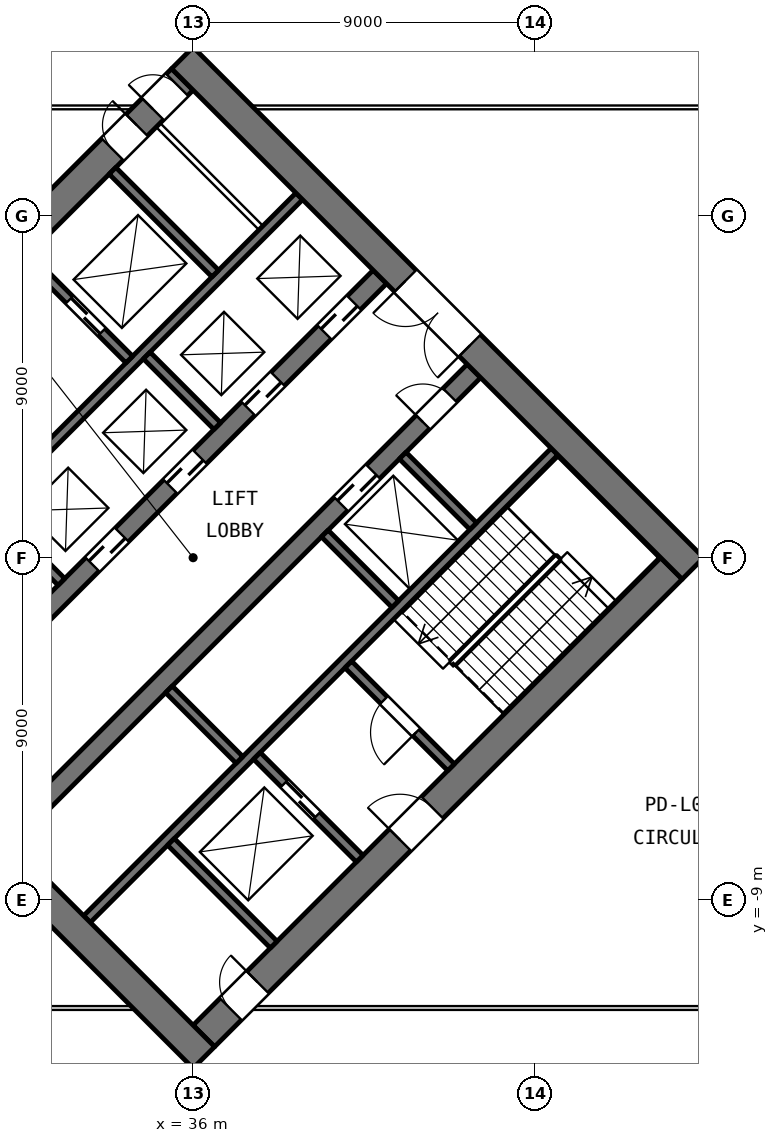
"""IFC4 building model, lengths in metres.
Left out: names, types, materials, properties, quantities, classifications, styles, units other than length and angle.
Written with IfcOpenShell. Run it as: python <this file> out.ifc"""

import sys

from ifc_helpers import new_model, si_unit, direction, frame, frame_2d, origin, place, context, subcontext, project, spatial, rectangle, extrude, element, fill, save


model = new_model("IFC4")
c1 = context("Model", 3, precision=1e-05, world=origin(), true_north=direction((0.0, 1.0)))
c2 = subcontext(c1, "Body", "Model", "MODEL_VIEW")
j1 = project(units=[si_unit("LENGTHUNIT", "METRE"), si_unit("PLANEANGLEUNIT", "RADIAN")], contexts=[c1])
p1 = place(None, origin())
s1 = spatial("IfcSite", under=j1, at=p1, CompositionType="ELEMENT")
p2 = place(p1, origin())
s2 = spatial("IfcBuilding", under=s1, at=p2, CompositionType="ELEMENT")
p3 = place(p2, frame((0.0, 0.0, 12.6)))
s3 = spatial("IfcBuildingStorey", under=s2, at=p3, CompositionType="ELEMENT", Elevation=12.6)
p4 = place(p3, frame((36.283, -12.586, 0.0), z_axis=(0.0, 0.0, 1.0), x_axis=(0.707106781187, 0.707106781187, 0.0)))
e1 = element("IfcWall", 1, at=p4, inside=s3, PredefinedType="SHEAR", context=c2, shape_type="SweptSolid", body=[
    extrude(rectangle(XDim=17.4, YDim=0.8, at=frame_2d((8.7, 0.0))), origin(), (0.0, 0.0, 1.0), 5.1),
])
p5 = place(p4, frame((7.3, 0.0, 0.0)))
e2 = element("IfcOpeningElement", 2, at=p5, cuts=e1, PredefinedType="OPENING", context=c2, shape_type="SweptSolid", body=[
    extrude(rectangle(XDim=1.2, YDim=2.1, at=frame_2d((0.6, 1.05))), frame((0.0, 0.41, 0.0), z_axis=(0.0, -1.0, 0.0), x_axis=(1.0, 0.0, 0.0)), (0.0, 0.0, 1.0), 0.82),
])
p6 = place(p4, frame((1.0, 0.0, 0.0)))
e3 = element("IfcOpeningElement", 3, at=p6, cuts=e1, PredefinedType="OPENING", context=c2, shape_type="SweptSolid", body=[
    extrude(rectangle(XDim=1.0, YDim=2.1, at=frame_2d((0.5, 1.05))), frame((0.0, 0.41, 0.0), z_axis=(0.0, -1.0, 0.0), x_axis=(1.0, 0.0, 0.0)), (0.0, 0.0, 1.0), 0.82),
])
p7 = place(p3, frame((33.207, -9.51, 0.0), z_axis=(0.0, 0.0, 1.0), x_axis=(0.707106781187, 0.707106781187, 0.0)))
e4 = element("IfcWall", 4, at=p7, inside=s3, PredefinedType="SHEAR", context=c2, shape_type="SweptSolid", body=[
    extrude(rectangle(XDim=17.4, YDim=0.25, at=frame_2d((8.7, 0.0))), origin(), (0.0, 0.0, 1.0), 5.1),
])
p8 = place(p3, frame((31.086, -7.389, 0.0), z_axis=(0.0, 0.0, 1.0), x_axis=(0.707106781187, 0.707106781187, 0.0)))
e5 = element("IfcWall", 5, at=p8, inside=s3, PredefinedType="SHEAR", context=c2, shape_type="SweptSolid", body=[
    extrude(rectangle(XDim=17.4, YDim=0.5, at=frame_2d((8.7, 0.0))), origin(), (0.0, 0.0, 1.0), 5.1),
])
p9 = place(p8, frame((12.45, 0.0, 0.0)))
e6 = element("IfcOpeningElement", 6, at=p9, cuts=e5, PredefinedType="OPENING", context=c2, shape_type="SweptSolid", body=[
    extrude(rectangle(XDim=1.2, YDim=2.1, at=frame_2d((0.6, 1.05))), frame((0.0, 0.26, 0.0), z_axis=(0.0, -1.0, 0.0), x_axis=(1.0, 0.0, 0.0)), (0.0, 0.0, 1.0), 0.52),
])
p10 = place(p8, frame((15.5, 0.0, 0.0)))
e7 = element("IfcOpeningElement", 7, at=p10, cuts=e5, PredefinedType="OPENING", context=c2, shape_type="SweptSolid", body=[
    extrude(rectangle(XDim=1.0, YDim=2.1, at=frame_2d((0.5, 1.05))), frame((0.0, 0.26, 0.0), z_axis=(0.0, -1.0, 0.0), x_axis=(1.0, 0.0, 0.0)), (0.0, 0.0, 1.0), 0.52),
])
p11 = place(p3, frame((28.611, -4.914, 0.0), z_axis=(0.0, 0.0, 1.0), x_axis=(0.707106781187, 0.707106781187, 0.0)))
e8 = element("IfcWall", 8, at=p11, inside=s3, PredefinedType="SHEAR", context=c2, shape_type="SweptSolid", body=[
    extrude(rectangle(XDim=17.4, YDim=0.5, at=frame_2d((8.7, 0.0))), origin(), (0.0, 0.0, 1.0), 5.1),
])
p12 = place(p11, frame((0.962, 0.0, 0.0)))
e9 = element("IfcOpeningElement", 9, at=p12, cuts=e8, PredefinedType="OPENING", context=c2, shape_type="SweptSolid", body=[
    extrude(rectangle(XDim=1.1, YDim=2.1, at=frame_2d((0.55, 1.05))), frame((0.0, 0.26, 0.0), z_axis=(0.0, -1.0, 0.0), x_axis=(1.0, 0.0, 0.0)), (0.0, 0.0, 1.0), 0.52),
])
p13 = place(p11, frame((3.8, 0.0, 0.0)))
e10 = element("IfcOpeningElement", 10, at=p13, cuts=e8, PredefinedType="OPENING", context=c2, shape_type="SweptSolid", body=[
    extrude(rectangle(XDim=1.1, YDim=2.1, at=frame_2d((0.55, 1.05))), frame((0.0, 0.26, 0.0), z_axis=(0.0, -1.0, 0.0), x_axis=(1.0, 0.0, 0.0)), (0.0, 0.0, 1.0), 0.52),
])
p14 = place(p11, frame((6.7, 0.0, 0.0)))
e11 = element("IfcOpeningElement", 11, at=p14, cuts=e8, PredefinedType="OPENING", context=c2, shape_type="SweptSolid", body=[
    extrude(rectangle(XDim=1.1, YDim=2.1, at=frame_2d((0.55, 1.05))), frame((0.0, 0.26, 0.0), z_axis=(0.0, -1.0, 0.0), x_axis=(1.0, 0.0, 0.0)), (0.0, 0.0, 1.0), 0.52),
])
p15 = place(p11, frame((9.6, 0.0, 0.0)))
e12 = element("IfcOpeningElement", 12, at=p15, cuts=e8, PredefinedType="OPENING", context=c2, shape_type="SweptSolid", body=[
    extrude(rectangle(XDim=1.1, YDim=2.1, at=frame_2d((0.55, 1.05))), frame((0.0, 0.26, 0.0), z_axis=(0.0, -1.0, 0.0), x_axis=(1.0, 0.0, 0.0)), (0.0, 0.0, 1.0), 0.52),
])
p16 = place(p11, frame((12.5, 0.0, 0.0)))
e13 = element("IfcOpeningElement", 13, at=p16, cuts=e8, PredefinedType="OPENING", context=c2, shape_type="SweptSolid", body=[
    extrude(rectangle(XDim=1.1, YDim=2.1, at=frame_2d((0.55, 1.05))), frame((0.0, 0.26, 0.0), z_axis=(0.0, -1.0, 0.0), x_axis=(1.0, 0.0, 0.0)), (0.0, 0.0, 1.0), 0.52),
])
p17 = place(p11, frame((15.337, 0.0, 0.0)))
e14 = element("IfcOpeningElement", 14, at=p17, cuts=e8, PredefinedType="OPENING", context=c2, shape_type="SweptSolid", body=[
    extrude(rectangle(XDim=1.1, YDim=2.1, at=frame_2d((0.55, 1.05))), frame((0.0, 0.26, 0.0), z_axis=(0.0, -1.0, 0.0), x_axis=(1.0, 0.0, 0.0)), (0.0, 0.0, 1.0), 0.52),
])
p18 = place(p3, frame((26.49, -2.793, 0.0), z_axis=(0.0, 0.0, 1.0), x_axis=(0.707106781187, 0.707106781187, 0.0)))
e15 = element("IfcWall", 15, at=p18, inside=s3, PredefinedType="SHEAR", context=c2, shape_type="SweptSolid", body=[
    extrude(rectangle(XDim=17.4, YDim=0.25, at=frame_2d((8.7, 0.0))), origin(), (0.0, 0.0, 1.0), 5.1),
])
p19 = place(p3, frame((23.414, 0.283, 0.0), z_axis=(0.0, 0.0, 1.0), x_axis=(0.707106781187, 0.707106781187, 0.0)))
e16 = element("IfcWall", 16, at=p19, inside=s3, PredefinedType="SHEAR", context=c2, shape_type="SweptSolid", body=[
    extrude(rectangle(XDim=17.4, YDim=0.8, at=frame_2d((8.7, 0.0))), origin(), (0.0, 0.0, 1.0), 5.1),
])
p20 = place(p19, frame((8.9, 0.0, 0.0)))
e17 = element("IfcOpeningElement", 17, at=p20, cuts=e16, PredefinedType="OPENING", context=c2, shape_type="SweptSolid", body=[
    extrude(rectangle(XDim=1.2, YDim=2.1, at=frame_2d((0.6, 1.05))), frame((0.0, 0.41, 0.0), z_axis=(0.0, -1.0, 0.0), x_axis=(1.0, 0.0, 0.0)), (0.0, 0.0, 1.0), 0.82),
])
p21 = place(p19, frame((14.8, 0.0, 0.0)))
e18 = element("IfcOpeningElement", 18, at=p21, cuts=e16, PredefinedType="OPENING", context=c2, shape_type="SweptSolid", body=[
    extrude(rectangle(XDim=0.9, YDim=2.1, at=frame_2d((0.45, 1.05))), frame((0.0, 0.41, 0.0), z_axis=(0.0, -1.0, 0.0), x_axis=(1.0, 0.0, 0.0)), (0.0, 0.0, 1.0), 0.82),
])
p22 = place(p19, frame((16.3, 0.0, 0.0)))
e19 = element("IfcOpeningElement", 19, at=p22, cuts=e16, PredefinedType="OPENING", context=c2, shape_type="SweptSolid", body=[
    extrude(rectangle(XDim=0.9, YDim=2.1, at=frame_2d((0.45, 1.05))), frame((0.0, 0.41, 0.0), z_axis=(0.0, -1.0, 0.0), x_axis=(1.0, 0.0, 0.0)), (0.0, 0.0, 1.0), 0.82),
])
p23 = place(p3, frame((36.283, -13.152, 0.0), z_axis=(0.0, 0.0, 1.0), x_axis=(-0.707106781187, 0.707106781187, 0.0)))
e20 = element("IfcWall", 20, at=p23, inside=s3, PredefinedType="SHEAR", context=c2, shape_type="SweptSolid", body=[
    extrude(rectangle(XDim=19.0, YDim=0.8, at=frame_2d((9.5, 0.0))), origin(), (0.0, 0.0, 1.0), 5.1),
])
p24 = place(p23, frame((8.3, 0.0, 0.0)))
e21 = element("IfcOpeningElement", 21, at=p24, cuts=e20, PredefinedType="OPENING", context=c2, shape_type="SweptSolid", body=[
    extrude(rectangle(XDim=2.4, YDim=2.1, at=frame_2d((1.2, 1.05))), frame((0.0, 0.41, 0.0), z_axis=(0.0, -1.0, 0.0), x_axis=(1.0, 0.0, 0.0)), (0.0, 0.0, 1.0), 0.82),
])
p25 = place(p3, frame((38.121, -10.182, 0.0), z_axis=(0.0, 0.0, 1.0), x_axis=(-0.707138693938, 0.707074866995, 0.0)))
e22 = element("IfcWall", 22, at=p25, inside=s3, PredefinedType="SHEAR", context=c2, shape_type="SweptSolid", body=[
    extrude(rectangle(XDim=3.825, YDim=0.25, at=frame_2d((1.913, 0.0))), origin(), (0.0, 0.0, 1.0), 5.1),
])
for number, where, z_axis, x_axis in (
    (23, (37.22, -5.321, 0.0), (0.0, 0.0, 1.0), (-0.707, 0.707, 0.0)),
    (24, (32.535, -0.636, 0.0), (0.0, 0.0, 1.0), (-0.707, 0.707, 0.0)),
):
    element("IfcWall", number, at=place(p3, frame(where, z_axis=z_axis, x_axis=x_axis)), inside=s3, PredefinedType="SHEAR", context=c2, shape_type="SweptSolid", body=[
        extrude(rectangle(XDim=2.625, YDim=0.25, at=frame_2d((1.312, 0.0))), origin(), (0.0, 0.0, 1.0), 5.1),
    ])
p26 = place(p3, frame((40.384, -7.92, 0.0), z_axis=(0.0, 0.0, 1.0), x_axis=(-0.707074866995, 0.707138693938, 0.0)))
e25 = element("IfcWall", 25, at=p26, inside=s3, PredefinedType="SHEAR", context=c2, shape_type="SweptSolid", body=[
    extrude(rectangle(XDim=3.825, YDim=0.25, at=frame_2d((1.913, 0.0))), origin(), (0.0, 0.0, 1.0), 5.1),
])
p27 = place(p26, frame((1.6, 0.0, 0.0)))
e26 = element("IfcOpeningElement", 26, at=p27, cuts=e25, PredefinedType="OPENING", context=c2, shape_type="SweptSolid", body=[
    extrude(rectangle(XDim=1.2, YDim=2.1, at=frame_2d((0.6, 1.05))), frame((0.0, 0.135, 0.0), z_axis=(0.0, -1.0, 0.0), x_axis=(1.0, 0.0, 0.0)), (0.0, 0.0, 1.0), 0.27),
])
p28 = place(p3, frame((42.788, -5.515, 0.0), z_axis=(0.0, 0.0, 1.0), x_axis=(-0.707106781187, 0.707106781187, 0.0)))
e27 = element("IfcWall", 27, at=p28, inside=s3, PredefinedType="SHEAR", context=c2, shape_type="SweptSolid", body=[
    extrude(rectangle(XDim=3.825, YDim=0.25, at=frame_2d((1.913, 0.0))), origin(), (0.0, 0.0, 1.0), 5.1),
])
p29 = place(p28, frame((1.3, 0.0, 0.0)))
e28 = element("IfcOpeningElement", 28, at=p29, cuts=e27, PredefinedType="OPENING", context=c2, shape_type="SweptSolid", body=[
    extrude(rectangle(XDim=1.2, YDim=2.1, at=frame_2d((0.6, 1.05))), frame((0.0, 0.135, 0.0), z_axis=(0.0, -1.0, 0.0), x_axis=(1.0, 0.0, 0.0)), (0.0, 0.0, 1.0), 0.27),
])
p30 = place(p3, frame((34.321, 5.215, 0.0), z_axis=(0.0, 0.0, 1.0), x_axis=(-0.707074866995, 0.707138693938, 0.0)))
e29 = element("IfcWall", 29, at=p30, inside=s3, PredefinedType="SHEAR", context=c2, shape_type="SweptSolid", body=[
    extrude(rectangle(XDim=3.825, YDim=0.25, at=frame_2d((1.913, 0.0))), origin(), (0.0, 0.0, 1.0), 5.1),
])
p31 = place(p30, frame((1.025, 0.0, 0.0)))
e30 = element("IfcOpeningElement", 30, at=p31, cuts=e29, PredefinedType="OPENING", context=c2, shape_type="SweptSolid", body=[
    extrude(rectangle(XDim=1.2, YDim=2.1, at=frame_2d((0.6, 1.05))), frame((0.0, 0.135, 0.0), z_axis=(0.0, -1.0, 0.0), x_axis=(1.0, 0.0, 0.0)), (0.0, 0.0, 1.0), 0.27),
])
for number, where, z_axis, x_axis in (
    (31, (41.321, -1.22, 0.0), (0.0, 0.0, 1.0), (-0.707, 0.707, 0.0)),
    (32, (36.636, 3.465, 0.0), (0.0, 0.0, 1.0), (-0.707, 0.707, 0.0)),
):
    element("IfcWall", number, at=place(p3, frame(where, z_axis=z_axis, x_axis=x_axis)), inside=s3, PredefinedType="SHEAR", context=c2, shape_type="SweptSolid", body=[
        extrude(rectangle(XDim=2.625, YDim=0.25, at=frame_2d((1.312, 0.0))), origin(), (0.0, 0.0, 1.0), 5.1),
    ])
p32 = place(p3, frame((36.583, 7.478, 0.0), z_axis=(0.0, 0.0, 1.0), x_axis=(-0.707138693938, 0.707074866995, 0.0)))
e33 = element("IfcWall", 33, at=p32, inside=s3, PredefinedType="SHEAR", context=c2, shape_type="SweptSolid", body=[
    extrude(rectangle(XDim=3.825, YDim=0.25, at=frame_2d((1.913, 0.0))), origin(), (0.0, 0.0, 1.0), 5.1),
])
p33 = place(p3, frame((43.372, 0.831, 0.0), z_axis=(0.0, 0.0, 1.0), x_axis=(-0.707106781187, 0.707106781187, 0.0)))
e34 = element("IfcWall", 34, at=p33, inside=s3, PredefinedType="SHEAR", context=c2, shape_type="SweptSolid", body=[
    extrude(rectangle(XDim=2.625, YDim=0.25, at=frame_2d((1.312, 0.0))), origin(), (0.0, 0.0, 1.0), 5.1),
])
p34 = place(p3, frame((37.785, 8.68, 0.0), z_axis=(0.0, 0.0, 1.0), x_axis=(-0.707074866995, 0.707138693938, 0.0)))
e35 = element("IfcWall", 35, at=p34, inside=s3, PredefinedType="PARTITIONING", context=c2, shape_type="SweptSolid", body=[
    extrude(rectangle(XDim=3.825, YDim=0.15, at=frame_2d((1.913, 0.0))), origin(), (0.0, 0.0, 1.0), 5.1),
])
p35 = place(p3, frame((49.152, -0.283, 0.0), z_axis=(0.0, 0.0, 1.0), x_axis=(-0.707106781187, 0.707106781187, 0.0)))
e36 = element("IfcWall", 36, at=p35, inside=s3, PredefinedType="SHEAR", context=c2, shape_type="SweptSolid", body=[
    extrude(rectangle(XDim=19.0, YDim=0.8, at=frame_2d((9.5, 0.0))), origin(), (0.0, 0.0, 1.0), 5.1),
])
p36 = place(p35, frame((8.3, 0.0, 0.0)))
e37 = element("IfcOpeningElement", 37, at=p36, cuts=e36, PredefinedType="OPENING", context=c2, shape_type="SweptSolid", body=[
    extrude(rectangle(XDim=2.4, YDim=2.1, at=frame_2d((1.2, 1.05))), frame((0.0, 0.41, 0.0), z_axis=(0.0, -1.0, 0.0), x_axis=(1.0, 0.0, 0.0)), (0.0, 0.0, 1.0), 0.82),
])
p37 = place(p3, frame((20.15, 11.85, 0.0), z_axis=(0.0, 0.0, 1.0), x_axis=(1.0, 0.0, 0.0)))
e38 = element("IfcWall", 38, at=p37, inside=s3, PredefinedType="PARTITIONING", context=c2, shape_type="SweptSolid", body=[
    extrude(rectangle(XDim=14.265, YDim=0.1, at=frame_2d((7.133, 0.0))), origin(), (0.0, 0.0, 1.0), 5.1),
])
p38 = place(p3, frame((37.585, 11.85, 0.0), z_axis=(0.0, 0.0, 1.0), x_axis=(1.0, 0.0, 0.0)))
e39 = element("IfcWall", 39, at=p38, inside=s3, PredefinedType="PARTITIONING", context=c2, shape_type="SweptSolid", body=[
    extrude(rectangle(XDim=29.015, YDim=0.1, at=frame_2d((14.508, 0.0))), origin(), (0.0, 0.0, 1.0), 5.1),
])
p39 = place(p38, frame((13.607, 0.0, 0.0)))
e40 = element("IfcOpeningElement", 40, at=p39, cuts=e39, PredefinedType="OPENING", context=c2, shape_type="SweptSolid", body=[
    extrude(rectangle(XDim=1.8, YDim=2.1, at=frame_2d((0.9, 1.05))), frame((0.0, 0.06, 0.0), z_axis=(0.0, -1.0, 0.0), x_axis=(1.0, 0.0, 0.0)), (0.0, 0.0, 1.0), 0.12),
])
p40 = place(p3, frame((13.0, -11.85, 0.0), z_axis=(0.0, 0.0, 1.0), x_axis=(1.0, 0.0, 0.0)))
e41 = element("IfcWall", 41, at=p40, inside=s3, PredefinedType="PARTITIONING", context=c2, shape_type="SweptSolid", body=[
    extrude(rectangle(XDim=21.415, YDim=0.1, at=frame_2d((10.708, 0.0))), origin(), (0.0, 0.0, 1.0), 5.1),
])
p41 = place(p3, frame((37.585, -11.85, 0.0), z_axis=(0.0, 0.0, 1.0), x_axis=(1.0, 0.0, 0.0)))
e42 = element("IfcWall", 42, at=p41, inside=s3, PredefinedType="PARTITIONING", context=c2, shape_type="SweptSolid", body=[
    extrude(rectangle(XDim=19.065, YDim=0.1, at=frame_2d((9.532, 0.0))), origin(), (0.0, 0.0, 1.0), 5.1),
])
p42 = place(p36, origin())
e43 = element("IfcDoor", 43, at=p42, inside=s3, OperationType="DOUBLE_DOOR_SINGLE_SWING", PredefinedType="DOOR", context=c2, shape_type="SweptSolid", body=[
    extrude(rectangle(XDim=2.4, YDim=2.1, at=frame_2d((1.2, 1.05))), frame((0.0, 0.275, 0.0), z_axis=(0.0, -1.0, 0.0), x_axis=(1.0, 0.0, 0.0)), (0.0, 0.0, 1.0), 0.05),
])
fill(e37, e43)
p43 = place(p14, origin())
e44 = element("IfcDoor", 44, at=p43, inside=s3, OperationType="SLIDING_TO_LEFT", PredefinedType="DOOR", context=c2, shape_type="SweptSolid", body=[
    extrude(rectangle(XDim=1.1, YDim=2.1, at=frame_2d((0.55, 1.05))), frame((0.0, 0.025, 0.0), z_axis=(0.0, -1.0, 0.0), x_axis=(1.0, 0.0, 0.0)), (0.0, 0.0, 1.0), 0.05),
])
fill(e11, e44)
p44 = place(p15, origin())
e45 = element("IfcDoor", 45, at=p44, inside=s3, OperationType="SLIDING_TO_LEFT", PredefinedType="DOOR", context=c2, shape_type="SweptSolid", body=[
    extrude(rectangle(XDim=1.1, YDim=2.1, at=frame_2d((0.55, 1.05))), frame((0.0, 0.025, 0.0), z_axis=(0.0, -1.0, 0.0), x_axis=(1.0, 0.0, 0.0)), (0.0, 0.0, 1.0), 0.05),
])
fill(e12, e45)
p45 = place(p16, origin())
e46 = element("IfcDoor", 46, at=p45, inside=s3, OperationType="SLIDING_TO_LEFT", PredefinedType="DOOR", context=c2, shape_type="SweptSolid", body=[
    extrude(rectangle(XDim=1.1, YDim=2.1, at=frame_2d((0.55, 1.05))), frame((0.0, 0.025, 0.0), z_axis=(0.0, -1.0, 0.0), x_axis=(1.0, 0.0, 0.0)), (0.0, 0.0, 1.0), 0.05),
])
fill(e13, e46)
p46 = place(p17, origin())
e47 = element("IfcDoor", 47, at=p46, inside=s3, OperationType="SLIDING_TO_LEFT", PredefinedType="DOOR", context=c2, shape_type="SweptSolid", body=[
    extrude(rectangle(XDim=1.1, YDim=2.1, at=frame_2d((0.55, 1.05))), frame((0.0, 0.025, 0.0), z_axis=(0.0, -1.0, 0.0), x_axis=(1.0, 0.0, 0.0)), (0.0, 0.0, 1.0), 0.05),
])
fill(e14, e47)
p47 = place(p9, origin())
e48 = element("IfcDoor", 48, at=p47, inside=s3, OperationType="SLIDING_TO_LEFT", PredefinedType="DOOR", context=c2, shape_type="SweptSolid", body=[
    extrude(rectangle(XDim=1.2, YDim=2.1, at=frame_2d((0.6, 1.05))), frame((0.0, 0.025, 0.0), z_axis=(0.0, -1.0, 0.0), x_axis=(1.0, 0.0, 0.0)), (0.0, 0.0, 1.0), 0.05),
])
fill(e6, e48)
p48 = place(p31, origin())
e49 = element("IfcDoor", 49, at=p48, inside=s3, OperationType="SLIDING_TO_LEFT", PredefinedType="DOOR", context=c2, shape_type="SweptSolid", body=[
    extrude(rectangle(XDim=1.2, YDim=2.1, at=frame_2d((0.6, 1.05))), frame((0.0, 0.025, 0.0), z_axis=(0.0, -1.0, 0.0), x_axis=(1.0, 0.0, 0.0)), (0.0, 0.0, 1.0), 0.05),
])
fill(e30, e49)
p49 = place(p27, origin())
e50 = element("IfcDoor", 50, at=p49, inside=s3, OperationType="SLIDING_TO_LEFT", PredefinedType="DOOR", context=c2, shape_type="SweptSolid", body=[
    extrude(rectangle(XDim=1.2, YDim=2.1, at=frame_2d((0.6, 1.05))), frame((0.0, 0.025, 0.0), z_axis=(0.0, -1.0, 0.0), x_axis=(1.0, 0.0, 0.0)), (0.0, 0.0, 1.0), 0.05),
])
fill(e26, e50)
p50 = place(p10, origin())
e51 = element("IfcDoor", 51, at=p50, inside=s3, OperationType="SINGLE_SWING_LEFT", PredefinedType="DOOR", context=c2, shape_type="SweptSolid", body=[
    extrude(rectangle(XDim=1.0, YDim=2.1, at=frame_2d((0.5, 1.05))), frame((0.0, 0.025, 0.0), z_axis=(0.0, -1.0, 0.0), x_axis=(1.0, 0.0, 0.0)), (0.0, 0.0, 1.0), 0.05),
])
fill(e7, e51)
p51 = place(p29, origin())
e52 = element("IfcDoor", 52, at=p51, inside=s3, OperationType="SINGLE_SWING_LEFT", PredefinedType="DOOR", context=c2, shape_type="SweptSolid", body=[
    extrude(rectangle(XDim=1.2, YDim=2.1, at=frame_2d((0.6, 1.05))), frame((0.0, 0.025, 0.0), z_axis=(0.0, -1.0, 0.0), x_axis=(1.0, 0.0, 0.0)), (0.0, 0.0, 1.0), 0.05),
])
fill(e28, e52)
p52 = place(p5, origin())
e53 = element("IfcDoor", 53, at=p52, inside=s3, OperationType="SINGLE_SWING_LEFT", PredefinedType="DOOR", context=c2, shape_type="SweptSolid", body=[
    extrude(rectangle(XDim=1.2, YDim=2.1, at=frame_2d((0.6, 1.05))), frame((0.0, 0.275, 0.0), z_axis=(0.0, -1.0, 0.0), x_axis=(1.0, 0.0, 0.0)), (0.0, 0.0, 1.0), 0.05),
])
fill(e2, e53)
p53 = place(p21, origin())
e54 = element("IfcDoor", 54, at=p53, inside=s3, OperationType="SINGLE_SWING_RIGHT", PredefinedType="DOOR", context=c2, shape_type="SweptSolid", body=[
    extrude(rectangle(XDim=0.9, YDim=2.1, at=frame_2d((0.45, 1.05))), frame((0.0, -0.225, 0.0), z_axis=(0.0, -1.0, 0.0), x_axis=(1.0, 0.0, 0.0)), (0.0, 0.0, 1.0), 0.05),
])
fill(e18, e54)
p54 = place(p22, origin())
e55 = element("IfcDoor", 55, at=p54, inside=s3, OperationType="SINGLE_SWING_LEFT", PredefinedType="DOOR", context=c2, shape_type="SweptSolid", body=[
    extrude(rectangle(XDim=0.9, YDim=2.1, at=frame_2d((0.45, 1.05))), frame((0.0, -0.225, 0.0), z_axis=(0.0, -1.0, 0.0), x_axis=(1.0, 0.0, 0.0)), (0.0, 0.0, 1.0), 0.05),
])
fill(e19, e55)
p55 = place(p6, origin())
e56 = element("IfcDoor", 56, at=p55, inside=s3, OperationType="SINGLE_SWING_RIGHT", PredefinedType="DOOR", context=c2, shape_type="SweptSolid", body=[
    extrude(rectangle(XDim=1.0, YDim=2.1, at=frame_2d((0.5, 1.05))), frame((0.0, 0.275, 0.0), z_axis=(0.0, -1.0, 0.0), x_axis=(1.0, 0.0, 0.0)), (0.0, 0.0, 1.0), 0.05),
])
fill(e3, e56)
save(model, sys.argv[1])
